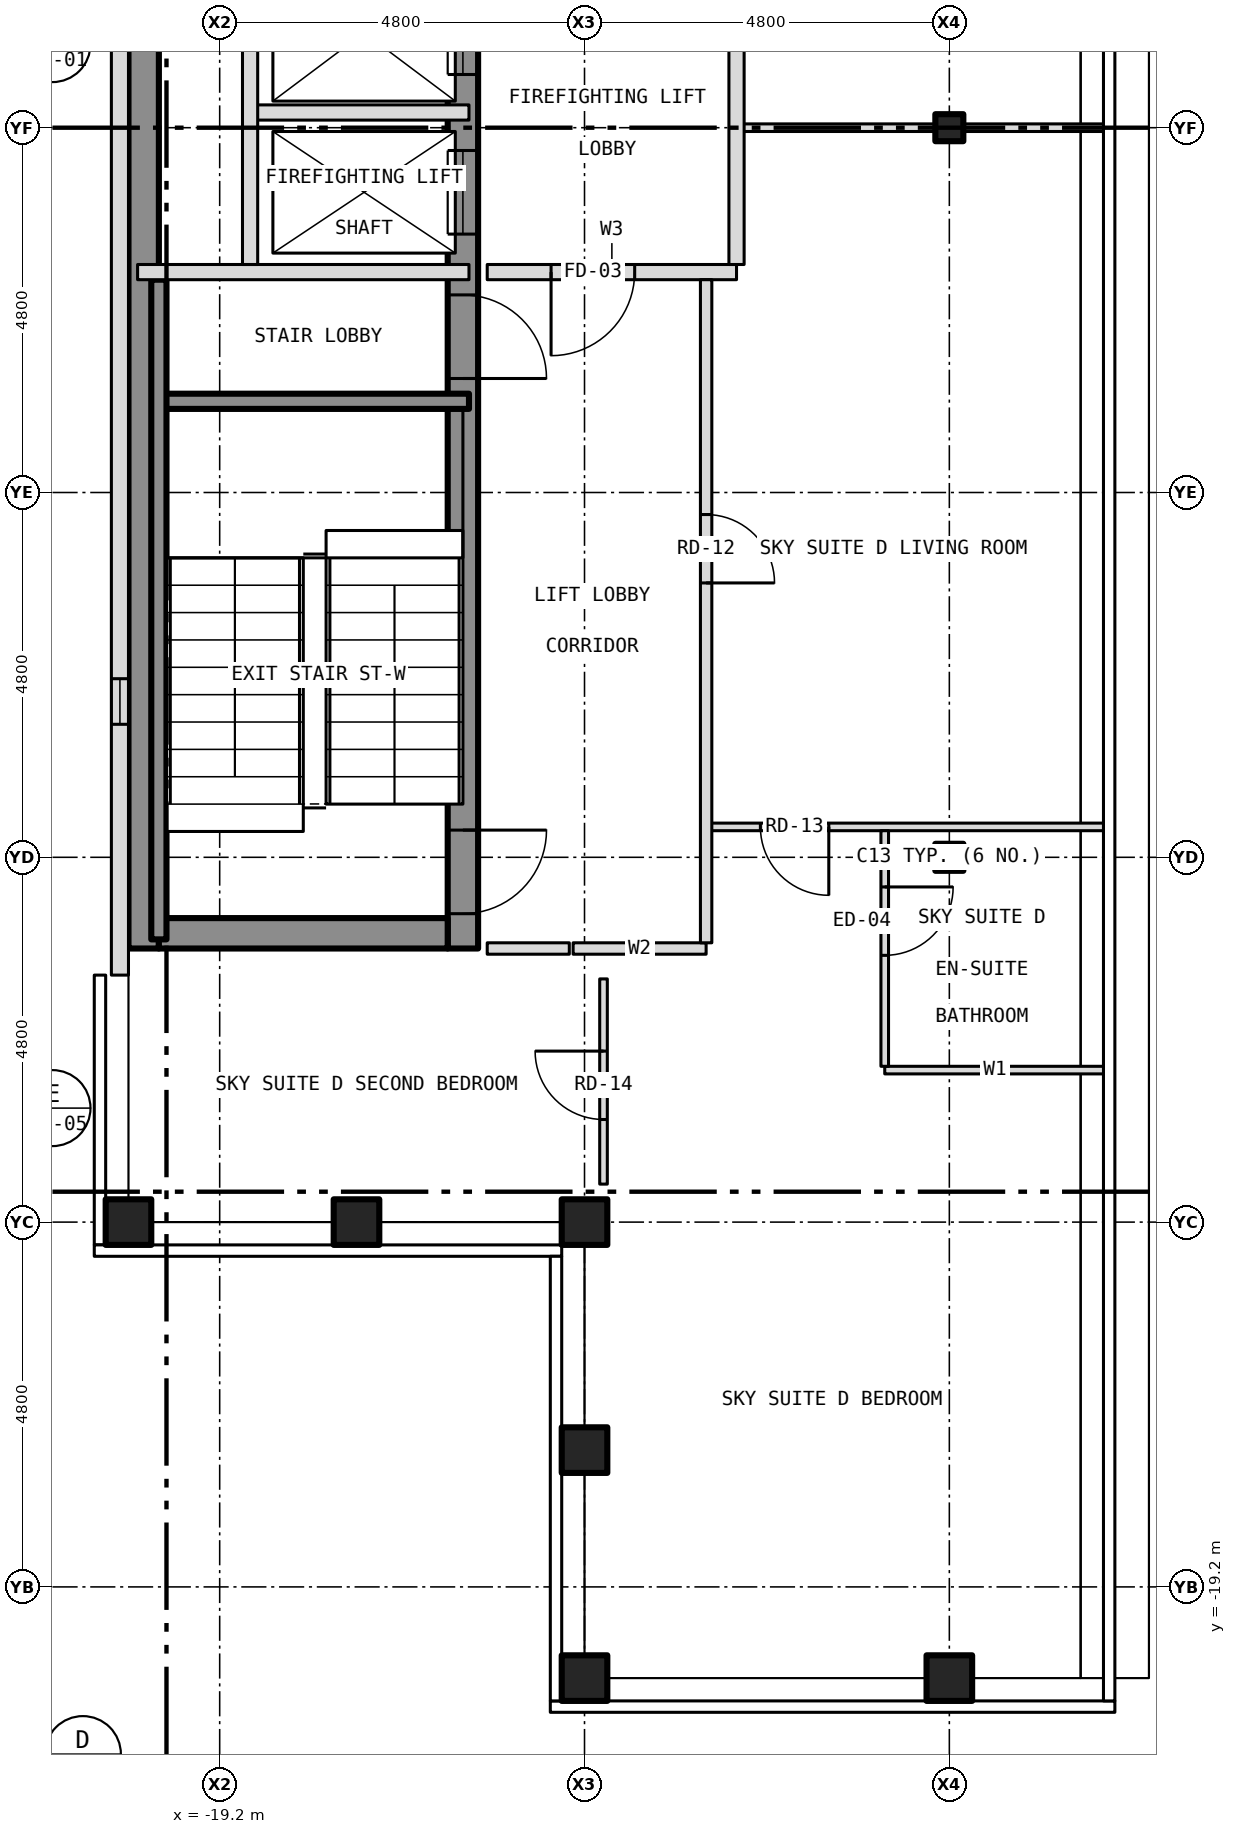
"""IFC4 building model, lengths in metres.
Left out: names, types, materials, properties, quantities, classifications, styles, units other than length and angle.
Written with IfcOpenShell. Run it as: python <this file> out.ifc"""

import sys

from ifc_helpers import new_model, si_unit, direction, frame, frame_2d, origin, origin_2d, place, context, subcontext, project, spatial, rectangle, hollow_rectangle, i_section, extrude, element, fill, save


model = new_model("IFC4")
c1 = context("Model", 3, precision=1e-05, world=origin(), true_north=direction((0.0, 1.0)))
c2 = subcontext(c1, "Body", "Model", "MODEL_VIEW")
j1 = project(units=[si_unit("LENGTHUNIT", "METRE"), si_unit("PLANEANGLEUNIT", "RADIAN")], contexts=[c1])
p1 = place(None, origin())
s1 = spatial("IfcSite", under=j1, at=p1, CompositionType="ELEMENT")
p2 = place(p1, origin())
s2 = spatial("IfcBuilding", under=s1, at=p2, CompositionType="ELEMENT")
p3 = place(p2, frame((0.0, 0.0, 269.0)))
s3 = spatial("IfcBuildingStorey", under=s2, at=p3, CompositionType="ELEMENT", Elevation=269.0)
for number, where, z_axis, x_axis in (
    (1, (-14.4, -20.4, -0.15), (0.0, 0.0, 1.0), (1.0, 0.0, 0.0)),
    (2, (-9.6, -20.4, -0.15), (0.0, 0.0, 1.0), (1.0, 0.0, 0.0)),
    (3, (-20.4, -14.4, -0.15), (0.0, 0.0, 1.0), (1.0, 0.0, 0.0)),
    (4, (-14.4, -14.4, -0.15), (0.0, 0.0, 1.0), (1.0, 0.0, 0.0)),
    (5, (-14.4, -17.4, -0.15), (0.0, 0.0, 1.0), (1.0, 0.0, 0.0)),
    (6, (-17.4, -14.4, -0.15), (0.0, 0.0, 1.0), (1.0, 0.0, 0.0)),
):
    element("IfcColumn", number, at=place(p3, frame(where, z_axis=z_axis, x_axis=x_axis)), inside=s3, PredefinedType="COLUMN", context=c2, shape_type="SweptSolid", body=[
        extrude(hollow_rectangle(XDim=0.6, YDim=0.6, WallThickness=0.03, at=origin_2d()), origin(), (0.0, 0.0, 1.0), 3.5),
    ])
for number, where, z_axis, x_axis in (
    (7, (-9.6, -9.6, -0.15), (0.0, 0.0, 1.0), (1.0, 0.0, 0.0)),
    (8, (-9.6, 0.0, -0.15), (0.0, 0.0, 1.0), (1.0, 0.0, 0.0)),
):
    element("IfcColumn", number, at=place(p3, frame(where, z_axis=z_axis, x_axis=x_axis)), inside=s3, PredefinedType="COLUMN", context=c2, shape_type="SweptSolid", body=[
        extrude(i_section(OverallWidth=0.368, OverallDepth=0.356, WebThickness=0.011, FlangeThickness=0.018, at=origin_2d()), origin(), (0.0, 0.0, 1.0), 3.5),
    ])
p4 = place(p3, frame((-16.0, -10.8, 0.0), z_axis=(0.0, 0.0, 1.0), x_axis=(0.0, 1.0, 0.0)))
e9 = element("IfcWall", 9, at=p4, inside=s3, PredefinedType="SHEAR", context=c2, shape_type="SweptSolid", body=[
    extrude(rectangle(XDim=21.6, YDim=0.4, at=frame_2d((10.8, 0.0))), origin(), (0.0, 0.0, 1.0), 3.25),
])
p5 = place(p4, frame((9.4, 0.0, 0.0)))
e10 = element("IfcOpeningElement", 10, at=p5, cuts=e9, PredefinedType="OPENING", context=c2, shape_type="SweptSolid", body=[
    extrude(rectangle(XDim=1.1, YDim=2.1, at=frame_2d((0.55, 1.05))), frame((0.0, 0.212, 0.0), z_axis=(0.0, -1.0, 0.0), x_axis=(1.0, 0.0, 0.0)), (0.0, 0.0, 1.0), 0.424),
])
p6 = place(p4, frame((11.5, 0.0, 0.0)))
e11 = element("IfcOpeningElement", 11, at=p6, cuts=e9, PredefinedType="OPENING", context=c2, shape_type="SweptSolid", body=[
    extrude(rectangle(XDim=1.1, YDim=2.1, at=frame_2d((0.55, 1.05))), frame((0.0, 0.212, 0.0), z_axis=(0.0, -1.0, 0.0), x_axis=(1.0, 0.0, 0.0)), (0.0, 0.0, 1.0), 0.424),
])
p7 = place(p4, frame((13.6, 0.0, 0.0)))
e12 = element("IfcOpeningElement", 12, at=p7, cuts=e9, PredefinedType="OPENING", context=c2, shape_type="SweptSolid", body=[
    extrude(rectangle(XDim=1.1, YDim=2.1, at=frame_2d((0.55, 1.05))), frame((0.0, 0.212, 0.0), z_axis=(0.0, -1.0, 0.0), x_axis=(1.0, 0.0, 0.0)), (0.0, 0.0, 1.0), 0.424),
])
p8 = place(p4, frame((15.7, 0.0, 0.0)))
e13 = element("IfcOpeningElement", 13, at=p8, cuts=e9, PredefinedType="OPENING", context=c2, shape_type="SweptSolid", body=[
    extrude(rectangle(XDim=1.1, YDim=2.1, at=frame_2d((0.55, 1.05))), frame((0.0, 0.212, 0.0), z_axis=(0.0, -1.0, 0.0), x_axis=(1.0, 0.0, 0.0)), (0.0, 0.0, 1.0), 0.424),
])
p9 = place(p4, frame((17.8, 0.0, 0.0)))
e14 = element("IfcOpeningElement", 14, at=p9, cuts=e9, PredefinedType="OPENING", context=c2, shape_type="SweptSolid", body=[
    extrude(rectangle(XDim=1.1, YDim=2.1, at=frame_2d((0.55, 1.05))), frame((0.0, 0.212, 0.0), z_axis=(0.0, -1.0, 0.0), x_axis=(1.0, 0.0, 0.0)), (0.0, 0.0, 1.0), 0.424),
])
p10 = place(p4, frame((0.458, 0.0, 0.0)))
e15 = element("IfcOpeningElement", 15, at=p10, cuts=e9, PredefinedType="OPENING", context=c2, shape_type="SweptSolid", body=[
    extrude(rectangle(XDim=1.1, YDim=2.1, at=frame_2d((0.55, 1.05))), frame((0.0, 0.212, 0.0), z_axis=(0.0, -1.0, 0.0), x_axis=(1.0, 0.0, 0.0)), (0.0, 0.0, 1.0), 0.424),
])
p11 = place(p4, frame((7.5, 0.0, 0.0)))
e16 = element("IfcOpeningElement", 16, at=p11, cuts=e9, PredefinedType="OPENING", context=c2, shape_type="SweptSolid", body=[
    extrude(rectangle(XDim=1.1, YDim=2.1, at=frame_2d((0.55, 1.05))), frame((0.0, 0.212, 0.0), z_axis=(0.0, -1.0, 0.0), x_axis=(1.0, 0.0, 0.0)), (0.0, 0.0, 1.0), 0.424),
])
p12 = place(p4, frame((20.0, 0.0, 0.0)))
e17 = element("IfcOpeningElement", 17, at=p12, cuts=e9, PredefinedType="OPENING", context=c2, shape_type="SweptSolid", body=[
    extrude(rectangle(XDim=0.9, YDim=2.1, at=frame_2d((0.45, 1.05))), frame((0.0, 0.212, 0.0), z_axis=(0.0, -1.0, 0.0), x_axis=(1.0, 0.0, 0.0)), (0.0, 0.0, 1.0), 0.424),
])
p13 = place(p3, frame((-20.2, -10.8, 0.0), z_axis=(0.0, 0.0, 1.0), x_axis=(0.0, 1.0, 0.0)))
e18 = element("IfcWall", 18, at=p13, inside=s3, PredefinedType="SHEAR", context=c2, shape_type="SweptSolid", body=[
    extrude(rectangle(XDim=21.6, YDim=0.4, at=frame_2d((10.8, 0.0))), origin(), (0.0, 0.0, 1.0), 3.25),
])
p14 = place(p3, frame((-20.0, -10.6, 0.0), z_axis=(0.0, 0.0, 1.0), x_axis=(1.0, 0.0, 0.0)))
e19 = element("IfcWall", 19, at=p14, inside=s3, PredefinedType="SHEAR", context=c2, shape_type="SweptSolid", body=[
    extrude(rectangle(XDim=3.8, YDim=0.4, at=frame_2d((1.9, 0.0))), origin(), (0.0, 0.0, 1.0), 3.25),
])
p15 = place(p3, frame((-20.512, 11.15, 0.0), z_axis=(0.0, 0.0, 1.0), x_axis=(0.0, -1.0, 0.0)))
e20 = element("IfcWall", 20, at=p15, inside=s3, PredefinedType="SOLIDWALL", context=c2, shape_type="SweptSolid", body=[
    extrude(rectangle(XDim=22.3, YDim=0.225, at=frame_2d((11.15, 0.0))), origin(), (0.0, 0.0, 1.0), 3.5),
])
p16 = place(p15, frame((18.4, 0.0, 1.0)))
e21 = element("IfcOpeningElement", 21, at=p16, cuts=e20, PredefinedType="OPENING", context=c2, shape_type="SweptSolid", body=[
    extrude(rectangle(XDim=0.6, YDim=1.5, at=frame_2d((0.3, 0.75))), frame((0.0, 0.125, 0.0), z_axis=(0.0, -1.0, 0.0), x_axis=(1.0, 0.0, 0.0)), (0.0, 0.0, 1.0), 0.249),
])
p17 = place(p3, frame((-10.45, -12.4, 0.0), z_axis=(0.0, 0.0, 1.0), x_axis=(1.0, 0.0, 0.0)))
e22 = element("IfcWall", 22, at=p17, inside=s3, PredefinedType="PARTITIONING", context=c2, shape_type="SweptSolid", body=[
    extrude(rectangle(XDim=2.908, YDim=0.1, at=frame_2d((1.454, 0.0))), origin(), (0.0, 0.0, 1.0), 3.35),
])
p18 = place(p3, frame((-15.68, -10.8, 0.0), z_axis=(0.0, 0.0, 1.0), x_axis=(1.0, 0.0, 0.0)))
e23 = element("IfcWall", 23, at=p18, inside=s3, PredefinedType="PARTITIONING", context=c2, shape_type="SweptSolid", body=[
    extrude(rectangle(XDim=1.08, YDim=0.15, at=frame_2d((0.54, 0.0))), origin(), (0.0, 0.0, 1.0), 3.35),
])
p19 = place(p3, frame((-14.55, -10.8, 0.0), z_axis=(0.0, 0.0, 1.0), x_axis=(1.0, 0.0, 0.0)))
e24 = element("IfcWall", 24, at=p19, inside=s3, PredefinedType="PARTITIONING", context=c2, shape_type="SweptSolid", body=[
    extrude(rectangle(XDim=1.75, YDim=0.15, at=frame_2d((0.875, 0.0))), origin(), (0.0, 0.0, 1.0), 3.35),
])
p20 = place(p3, frame((-12.8, -9.2, 0.0), z_axis=(0.0, 0.0, 1.0), x_axis=(1.0, 0.0, 0.0)))
e25 = element("IfcWall", 25, at=p20, inside=s3, PredefinedType="PARTITIONING", context=c2, shape_type="SweptSolid", body=[
    extrude(rectangle(XDim=5.258, YDim=0.1, at=frame_2d((2.629, 0.0))), origin(), (0.0, 0.0, 1.0), 3.35),
])
p21 = place(p20, frame((0.714, 0.0, 0.0)))
e26 = element("IfcOpeningElement", 26, at=p21, cuts=e25, PredefinedType="OPENING", context=c2, shape_type="SweptSolid", body=[
    extrude(rectangle(XDim=0.9, YDim=2.1, at=frame_2d((0.45, 1.05))), frame((0.0, 0.062, 0.0), z_axis=(0.0, -1.0, 0.0), x_axis=(1.0, 0.0, 0.0)), (0.0, 0.0, 1.0), 0.124),
])
p22 = place(p3, frame((-20.0, -3.6, 0.0), z_axis=(0.0, 0.0, 1.0), x_axis=(1.0, 0.0, 0.0)))
e27 = element("IfcWall", 27, at=p22, inside=s3, PredefinedType="SHEAR", context=c2, shape_type="SweptSolid", body=[
    extrude(rectangle(XDim=4.08, YDim=0.2, at=frame_2d((2.04, 0.0))), origin(), (0.0, 0.0, 1.0), 3.25),
])
p23 = place(p3, frame((-20.28, -1.9, 0.0), z_axis=(0.0, 0.0, 1.0), x_axis=(1.0, 0.0, 0.0)))
e28 = element("IfcWall", 28, at=p23, inside=s3, PredefinedType="PARTITIONING", context=c2, shape_type="SweptSolid", body=[
    extrude(rectangle(XDim=4.36, YDim=0.2, at=frame_2d((2.18, 0.0))), origin(), (0.0, 0.0, 1.0), 3.25),
])
p24 = place(p3, frame((-15.68, -1.9, 0.0), z_axis=(0.0, 0.0, 1.0), x_axis=(1.0, 0.0, 0.0)))
e29 = element("IfcWall", 29, at=p24, inside=s3, PredefinedType="PARTITIONING", context=c2, shape_type="SweptSolid", body=[
    extrude(rectangle(XDim=3.28, YDim=0.2, at=frame_2d((1.64, 0.0))), origin(), (0.0, 0.0, 1.0), 3.35),
])
p25 = place(p24, frame((0.84, 0.0, 0.0)))
e30 = element("IfcOpeningElement", 30, at=p25, cuts=e29, PredefinedType="OPENING", context=c2, shape_type="SweptSolid", body=[
    extrude(rectangle(XDim=1.1, YDim=2.1, at=frame_2d((0.55, 1.05))), frame((0.0, 0.112, 0.0), z_axis=(0.0, -1.0, 0.0), x_axis=(1.0, 0.0, 0.0)), (0.0, 0.0, 1.0), 0.224),
])
p26 = place(p3, frame((-12.4, 0.0, 0.0), z_axis=(0.0, 0.0, 1.0), x_axis=(1.0, 0.0, 0.0)))
e31 = element("IfcWall", 31, at=p26, inside=s3, PredefinedType="PARTITIONING", context=c2, shape_type="SweptSolid", body=[
    extrude(rectangle(XDim=2.616, YDim=0.1, at=frame_2d((1.308, 0.0))), origin(), (0.0, 0.0, 1.0), 2.728),
])
p27 = place(p3, frame((-9.784, 0.0, 0.0), z_axis=(0.0, 0.0, 1.0), x_axis=(1.0, 0.0, 0.0)))
e32 = element("IfcWall", 32, at=p27, inside=s3, PredefinedType="PARTITIONING", context=c2, shape_type="SweptSolid", body=[
    extrude(rectangle(XDim=0.368, YDim=0.1, at=frame_2d((0.184, 0.0))), origin(), (0.0, 0.0, 1.0), 3.35),
])
p28 = place(p3, frame((-9.416, 0.0, 0.0), z_axis=(0.0, 0.0, 1.0), x_axis=(1.0, 0.0, 0.0)))
e33 = element("IfcWall", 33, at=p28, inside=s3, PredefinedType="PARTITIONING", context=c2, shape_type="SweptSolid", body=[
    extrude(rectangle(XDim=1.874, YDim=0.1, at=frame_2d((0.937, 0.0))), origin(), (0.0, 0.0, 1.0), 2.728),
])
p29 = place(p3, frame((-18.8, 0.2, 0.0), z_axis=(0.0, 0.0, 1.0), x_axis=(1.0, 0.0, 0.0)))
e34 = element("IfcWall", 34, at=p29, inside=s3, PredefinedType="PARTITIONING", context=c2, shape_type="SweptSolid", body=[
    extrude(rectangle(XDim=2.88, YDim=0.2, at=frame_2d((1.44, 0.0))), origin(), (0.0, 0.0, 1.0), 3.25),
])
p30 = place(p3, frame((-20.0, -10.68, 0.0), z_axis=(0.0, 0.0, 1.0), x_axis=(0.0, 1.0, 0.0)))
e35 = element("IfcWall", 35, at=p30, inside=s3, PredefinedType="SHEAR", context=c2, shape_type="SweptSolid", body=[
    extrude(rectangle(XDim=8.68, YDim=0.2, at=frame_2d((4.34, 0.0))), origin(), (0.0, 0.0, 1.0), 3.25),
])
p31 = place(p3, frame((-18.8, -1.8, 0.0), z_axis=(0.0, 0.0, 1.0), x_axis=(0.0, 1.0, 0.0)))
e36 = element("IfcWall", 36, at=p31, inside=s3, PredefinedType="PARTITIONING", context=c2, shape_type="SweptSolid", body=[
    extrude(rectangle(XDim=8.2, YDim=0.2, at=frame_2d((4.1, 0.0))), origin(), (0.0, 0.0, 1.0), 3.25),
])
p32 = place(p3, frame((-14.15, -13.9, 0.0), z_axis=(0.0, 0.0, 1.0), x_axis=(0.0, 1.0, 0.0)))
e37 = element("IfcWall", 37, at=p32, inside=s3, PredefinedType="PARTITIONING", context=c2, shape_type="SweptSolid", body=[
    extrude(rectangle(XDim=2.7, YDim=0.1, at=frame_2d((1.35, 0.0))), origin(), (0.0, 0.0, 1.0), 3.35),
])
p33 = place(p32, frame((0.85, 0.0, 0.0)))
e38 = element("IfcOpeningElement", 38, at=p33, cuts=e37, PredefinedType="OPENING", context=c2, shape_type="SweptSolid", body=[
    extrude(rectangle(XDim=0.9, YDim=2.1, at=frame_2d((0.45, 1.05))), frame((0.0, 0.062, 0.0), z_axis=(0.0, -1.0, 0.0), x_axis=(1.0, 0.0, 0.0)), (0.0, 0.0, 1.0), 0.124),
])
p34 = place(p3, frame((-12.8, -10.725, 0.0), z_axis=(0.0, 0.0, 1.0), x_axis=(0.0, 1.0, 0.0)))
e39 = element("IfcWall", 39, at=p34, inside=s3, PredefinedType="PARTITIONING", context=c2, shape_type="SweptSolid", body=[
    extrude(rectangle(XDim=8.725, YDim=0.15, at=frame_2d((4.363, 0.0))), origin(), (0.0, 0.0, 1.0), 3.35),
])
p35 = place(p34, frame((4.735, 0.0, 0.0)))
e40 = element("IfcOpeningElement", 40, at=p35, cuts=e39, PredefinedType="OPENING", context=c2, shape_type="SweptSolid", body=[
    extrude(rectangle(XDim=0.9, YDim=2.1, at=frame_2d((0.45, 1.05))), frame((0.0, 0.087, 0.0), z_axis=(0.0, -1.0, 0.0), x_axis=(1.0, 0.0, 0.0)), (0.0, 0.0, 1.0), 0.174),
])
p36 = place(p3, frame((-12.4, -1.8, 0.0), z_axis=(0.0, 0.0, 1.0), x_axis=(0.0, 1.0, 0.0)))
e41 = element("IfcWall", 41, at=p36, inside=s3, PredefinedType="PARTITIONING", context=c2, shape_type="SweptSolid", body=[
    extrude(rectangle(XDim=4.0, YDim=0.2, at=frame_2d((2.0, 0.0))), origin(), (0.0, 0.0, 1.0), 3.35),
])
p37 = place(p3, frame((-10.45, -12.35, 0.0), z_axis=(0.0, 0.0, 1.0), x_axis=(0.0, 1.0, 0.0)))
e42 = element("IfcWall", 42, at=p37, inside=s3, PredefinedType="PARTITIONING", context=c2, shape_type="SweptSolid", body=[
    extrude(rectangle(XDim=3.1, YDim=0.1, at=frame_2d((1.55, 0.0))), origin(), (0.0, 0.0, 1.0), 3.35),
])
p38 = place(p37, frame((1.46, 0.0, 0.0)))
e43 = element("IfcOpeningElement", 43, at=p38, cuts=e42, PredefinedType="OPENING", context=c2, shape_type="SweptSolid", body=[
    extrude(rectangle(XDim=0.9, YDim=2.1, at=frame_2d((0.45, 1.05))), frame((0.0, 0.062, 0.0), z_axis=(0.0, -1.0, 0.0), x_axis=(1.0, 0.0, 0.0)), (0.0, 0.0, 1.0), 0.124),
])
p39 = place(p16, origin())
e44 = element("IfcWindow", 44, at=p39, inside=s3, PartitioningType="SINGLE_PANEL", PredefinedType="WINDOW", context=c2, shape_type="SweptSolid", body=[
    extrude(rectangle(XDim=0.6, YDim=1.5, at=frame_2d((0.3, 0.75))), frame((0.0, -0.022, 0.0), z_axis=(0.0, -1.0, 0.0), x_axis=(1.0, 0.0, 0.0)), (0.0, 0.0, 1.0), 0.06),
])
fill(e21, e44)
p40 = place(p5, origin())
e45 = element("IfcDoor", 45, at=p40, inside=s3, OperationType="SLIDING_TO_LEFT", PredefinedType="DOOR", context=c2, shape_type="SweptSolid", body=[
    extrude(rectangle(XDim=1.1, YDim=2.1, at=frame_2d((0.55, 1.05))), frame((0.0, 0.025, 0.0), z_axis=(0.0, -1.0, 0.0), x_axis=(1.0, 0.0, 0.0)), (0.0, 0.0, 1.0), 0.05),
])
fill(e10, e45)
p41 = place(p6, origin())
e46 = element("IfcDoor", 46, at=p41, inside=s3, OperationType="SLIDING_TO_LEFT", PredefinedType="DOOR", context=c2, shape_type="SweptSolid", body=[
    extrude(rectangle(XDim=1.1, YDim=2.1, at=frame_2d((0.55, 1.05))), frame((0.0, 0.025, 0.0), z_axis=(0.0, -1.0, 0.0), x_axis=(1.0, 0.0, 0.0)), (0.0, 0.0, 1.0), 0.05),
])
fill(e11, e46)
p42 = place(p10, origin())
e47 = element("IfcDoor", 47, at=p42, inside=s3, OperationType="SINGLE_SWING_RIGHT", PredefinedType="DOOR", context=c2, shape_type="SweptSolid", body=[
    extrude(rectangle(XDim=1.1, YDim=2.1, at=frame_2d((0.55, 1.05))), frame((0.0, 0.025, 0.0), z_axis=(0.0, -1.0, 0.0), x_axis=(1.0, 0.0, 0.0)), (0.0, 0.0, 1.0), 0.05),
])
fill(e15, e47)
p43 = place(p11, origin())
e48 = element("IfcDoor", 48, at=p43, inside=s3, OperationType="SINGLE_SWING_LEFT", PredefinedType="DOOR", context=c2, shape_type="SweptSolid", body=[
    extrude(rectangle(XDim=1.1, YDim=2.1, at=frame_2d((0.55, 1.05))), frame((0.0, 0.025, 0.0), z_axis=(0.0, -1.0, 0.0), x_axis=(1.0, 0.0, 0.0)), (0.0, 0.0, 1.0), 0.05),
])
fill(e16, e48)
p44 = place(p25, origin())
e49 = element("IfcDoor", 49, at=p44, inside=s3, OperationType="SINGLE_SWING_LEFT", PredefinedType="DOOR", context=c2, shape_type="SweptSolid", body=[
    extrude(rectangle(XDim=1.1, YDim=2.1, at=frame_2d((0.55, 1.05))), frame((0.0, 0.025, 0.0), z_axis=(0.0, -1.0, 0.0), x_axis=(1.0, 0.0, 0.0)), (0.0, 0.0, 1.0), 0.05),
])
fill(e30, e49)
p45 = place(p35, origin())
e50 = element("IfcDoor", 50, at=p45, inside=s3, OperationType="SINGLE_SWING_LEFT", PredefinedType="DOOR", context=c2, shape_type="SweptSolid", body=[
    extrude(rectangle(XDim=0.9, YDim=2.1, at=frame_2d((0.45, 1.05))), frame((0.0, 0.025, 0.0), z_axis=(0.0, -1.0, 0.0), x_axis=(1.0, 0.0, 0.0)), (0.0, 0.0, 1.0), 0.05),
])
fill(e40, e50)
p46 = place(p21, origin())
e51 = element("IfcDoor", 51, at=p46, inside=s3, OperationType="SINGLE_SWING_RIGHT", PredefinedType="DOOR", context=c2, shape_type="SweptSolid", body=[
    extrude(rectangle(XDim=0.9, YDim=2.1, at=frame_2d((0.45, 1.05))), frame((0.0, 0.025, 0.0), z_axis=(0.0, -1.0, 0.0), x_axis=(1.0, 0.0, 0.0)), (0.0, 0.0, 1.0), 0.05),
])
fill(e26, e51)
p47 = place(p38, origin())
e52 = element("IfcDoor", 52, at=p47, inside=s3, OperationType="SINGLE_SWING_RIGHT", PredefinedType="DOOR", context=c2, shape_type="SweptSolid", body=[
    extrude(rectangle(XDim=0.9, YDim=2.1, at=frame_2d((0.45, 1.05))), frame((0.0, 0.025, 0.0), z_axis=(0.0, -1.0, 0.0), x_axis=(1.0, 0.0, 0.0)), (0.0, 0.0, 1.0), 0.05),
])
fill(e43, e52)
p48 = place(p33, origin())
e53 = element("IfcDoor", 53, at=p48, inside=s3, OperationType="SINGLE_SWING_RIGHT", PredefinedType="DOOR", context=c2, shape_type="SweptSolid", body=[
    extrude(rectangle(XDim=0.9, YDim=2.1, at=frame_2d((0.45, 1.05))), frame((0.0, 0.025, 0.0), z_axis=(0.0, -1.0, 0.0), x_axis=(1.0, 0.0, 0.0)), (0.0, 0.0, 1.0), 0.05),
])
fill(e38, e53)
save(model, sys.argv[1])
